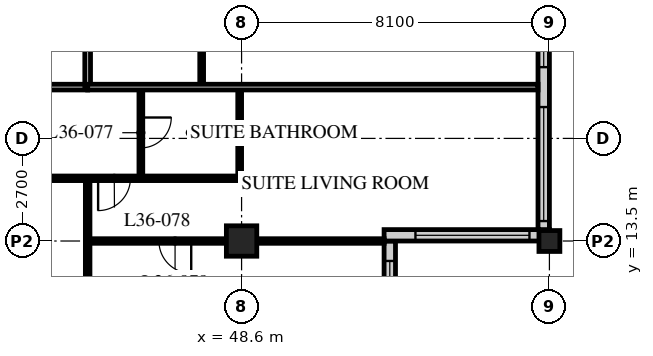
"""IFC4 building model, lengths in metres.
Left out: names, types, materials, properties, quantities, classifications, styles, units other than length and angle.
Written with IfcOpenShell. Run it as: python <this file> out.ifc"""

import sys

from ifc_helpers import new_model, si_unit, direction, frame, frame_2d, origin, origin_2d, place, context, subcontext, project, spatial, rectangle, hollow_rectangle, extrude, element, fill, save


model = new_model("IFC4")
c1 = context("Model", 3, precision=1e-05, world=origin(), true_north=direction((0.0, 1.0)))
c2 = subcontext(c1, "Body", "Model", "MODEL_VIEW")
j1 = project(units=[si_unit("LENGTHUNIT", "METRE"), si_unit("PLANEANGLEUNIT", "RADIAN")], contexts=[c1])
p1 = place(None, origin())
s1 = spatial("IfcSite", under=j1, at=p1, CompositionType="ELEMENT")
p2 = place(p1, origin())
s2 = spatial("IfcBuilding", under=s1, at=p2, CompositionType="ELEMENT")
p3 = place(p2, frame((0.0, 0.0, 140.8)))
s3 = spatial("IfcBuildingStorey", under=s2, at=p3, CompositionType="ELEMENT", Elevation=140.8)
p4 = place(p3, frame((48.6, 13.5, 0.0), z_axis=(0.0, 0.0, 1.0), x_axis=(1.0, 0.0, 0.0)))
e1 = element("IfcColumn", 1, at=p4, inside=s3, PredefinedType="COLUMN", context=c2, shape_type="SweptSolid", body=[
    extrude(hollow_rectangle(XDim=0.8, YDim=0.8, WallThickness=0.08, at=origin_2d()), origin(), (0.0, 0.0, 1.0), 3.4),
])
p5 = place(p3, frame((56.7, 13.5, 0.0), z_axis=(0.0, 0.0, 1.0), x_axis=(1.0, 0.0, 0.0)))
e2 = element("IfcColumn", 2, at=p5, inside=s3, PredefinedType="COLUMN", context=c2, shape_type="SweptSolid", body=[
    extrude(hollow_rectangle(XDim=0.55, YDim=0.55, WallThickness=0.04, at=origin_2d()), origin(), (0.0, 0.0, 1.0), 3.4),
])
p6 = place(p3, frame((52.5, 9.75, 0.0), z_axis=(0.0, 0.0, 1.0), x_axis=(0.0, 1.0, 0.0)))
e3 = element("IfcWall", 3, at=p6, inside=s3, PredefinedType="SOLIDWALL", context=c2, shape_type="SweptSolid", body=[
    extrude(rectangle(XDim=3.75, YDim=0.3, at=frame_2d((1.875, 0.0))), origin(), (0.0, 0.0, 1.0), 3.19),
])
p7 = place(p6, frame((0.225, 0.0, 0.9)))
e4 = element("IfcOpeningElement", 4, at=p7, cuts=e3, PredefinedType="OPENING", context=c2, shape_type="SweptSolid", body=[
    extrude(rectangle(XDim=3.0, YDim=1.5, at=frame_2d((1.5, 0.75))), frame((0.0, 0.16, 0.0), z_axis=(0.0, -1.0, 0.0), x_axis=(1.0, 0.0, 0.0)), (0.0, 0.0, 1.0), 0.32),
])
p8 = place(p3, frame((52.35, 13.65, 0.0), z_axis=(0.0, 0.0, 1.0), x_axis=(1.0, 0.0, 0.0)))
e5 = element("IfcWall", 5, at=p8, inside=s3, PredefinedType="SOLIDWALL", context=c2, shape_type="SweptSolid", body=[
    extrude(rectangle(XDim=4.35, YDim=0.3, at=frame_2d((2.175, 0.0))), origin(), (0.0, 0.0, 1.0), 3.19),
])
p9 = place(p8, frame((0.825, 0.0, 0.9)))
e6 = element("IfcOpeningElement", 6, at=p9, cuts=e5, PredefinedType="OPENING", context=c2, shape_type="SweptSolid", body=[
    extrude(rectangle(XDim=3.0, YDim=1.5, at=frame_2d((1.5, 0.75))), frame((0.0, 0.16, 0.0), z_axis=(0.0, -1.0, 0.0), x_axis=(1.0, 0.0, 0.0)), (0.0, 0.0, 1.0), 0.32),
])
p10 = place(p3, frame((56.55, 13.8, 0.0), z_axis=(0.0, 0.0, 1.0), x_axis=(0.0, 1.0, 0.0)))
e7 = element("IfcWall", 7, at=p10, inside=s3, PredefinedType="SOLIDWALL", context=c2, shape_type="SweptSolid", body=[
    extrude(rectangle(XDim=32.1, YDim=0.3, at=frame_2d((16.05, 0.0))), origin(), (0.0, 0.0, 1.0), 3.19),
])
p11 = place(p10, frame((0.225, 0.0, 0.9)))
e8 = element("IfcOpeningElement", 8, at=p11, cuts=e7, PredefinedType="OPENING", context=c2, shape_type="SweptSolid", body=[
    extrude(rectangle(XDim=3.0, YDim=2.0, at=frame_2d((1.5, 1.0))), frame((0.0, 0.16, 0.0), z_axis=(0.0, -1.0, 0.0), x_axis=(1.0, 0.0, 0.0)), (0.0, 0.0, 1.0), 0.32),
])
p12 = place(p10, frame((4.275, 0.0, 0.9)))
e9 = element("IfcOpeningElement", 9, at=p12, cuts=e7, PredefinedType="OPENING", context=c2, shape_type="SweptSolid", body=[
    extrude(rectangle(XDim=3.0, YDim=2.0, at=frame_2d((1.5, 1.0))), frame((0.0, 0.16, 0.0), z_axis=(0.0, -1.0, 0.0), x_axis=(1.0, 0.0, 0.0)), (0.0, 0.0, 1.0), 0.32),
])
p13 = place(p10, frame((8.325, 0.0, 0.9)))
e10 = element("IfcOpeningElement", 10, at=p13, cuts=e7, PredefinedType="OPENING", context=c2, shape_type="SweptSolid", body=[
    extrude(rectangle(XDim=3.0, YDim=2.0, at=frame_2d((1.5, 1.0))), frame((0.0, 0.16, 0.0), z_axis=(0.0, -1.0, 0.0), x_axis=(1.0, 0.0, 0.0)), (0.0, 0.0, 1.0), 0.32),
])
p14 = place(p10, frame((12.375, 0.0, 0.9)))
e11 = element("IfcOpeningElement", 11, at=p14, cuts=e7, PredefinedType="OPENING", context=c2, shape_type="SweptSolid", body=[
    extrude(rectangle(XDim=3.0, YDim=2.0, at=frame_2d((1.5, 1.0))), frame((0.0, 0.16, 0.0), z_axis=(0.0, -1.0, 0.0), x_axis=(1.0, 0.0, 0.0)), (0.0, 0.0, 1.0), 0.32),
])
p15 = place(p10, frame((16.425, 0.0, 0.9)))
e12 = element("IfcOpeningElement", 12, at=p15, cuts=e7, PredefinedType="OPENING", context=c2, shape_type="SweptSolid", body=[
    extrude(rectangle(XDim=3.0, YDim=2.0, at=frame_2d((1.5, 1.0))), frame((0.0, 0.16, 0.0), z_axis=(0.0, -1.0, 0.0), x_axis=(1.0, 0.0, 0.0)), (0.0, 0.0, 1.0), 0.32),
])
p16 = place(p10, frame((20.475, 0.0, 0.9)))
e13 = element("IfcOpeningElement", 13, at=p16, cuts=e7, PredefinedType="OPENING", context=c2, shape_type="SweptSolid", body=[
    extrude(rectangle(XDim=3.0, YDim=2.0, at=frame_2d((1.5, 1.0))), frame((0.0, 0.16, 0.0), z_axis=(0.0, -1.0, 0.0), x_axis=(1.0, 0.0, 0.0)), (0.0, 0.0, 1.0), 0.32),
])
p17 = place(p10, frame((24.525, 0.0, 0.9)))
e14 = element("IfcOpeningElement", 14, at=p17, cuts=e7, PredefinedType="OPENING", context=c2, shape_type="SweptSolid", body=[
    extrude(rectangle(XDim=3.0, YDim=2.0, at=frame_2d((1.5, 1.0))), frame((0.0, 0.16, 0.0), z_axis=(0.0, -1.0, 0.0), x_axis=(1.0, 0.0, 0.0)), (0.0, 0.0, 1.0), 0.32),
])
p18 = place(p10, frame((28.575, 0.0, 0.9)))
e15 = element("IfcOpeningElement", 15, at=p18, cuts=e7, PredefinedType="OPENING", context=c2, shape_type="SweptSolid", body=[
    extrude(rectangle(XDim=3.0, YDim=2.0, at=frame_2d((1.5, 1.0))), frame((0.0, 0.16, 0.0), z_axis=(0.0, -1.0, 0.0), x_axis=(1.0, 0.0, 0.0)), (0.0, 0.0, 1.0), 0.32),
])
p19 = place(p3, frame((8.1, 17.55, 0.0), z_axis=(0.0, 0.0, 1.0), x_axis=(1.0, 0.0, 0.0)))
e16 = element("IfcWall", 16, at=p19, inside=s3, PredefinedType="PARTITIONING", context=c2, shape_type="SweptSolid", body=[
    extrude(rectangle(XDim=36.45, YDim=0.15, at=frame_2d((18.225, 0.0))), origin(), (0.0, 0.0, 1.0), 3.19),
])
p20 = place(p19, frame((9.625, 0.0, 0.0)))
e17 = element("IfcOpeningElement", 17, at=p20, cuts=e16, PredefinedType="OPENING", context=c2, shape_type="SweptSolid", body=[
    extrude(rectangle(XDim=1.0, YDim=2.1, at=frame_2d((0.5, 1.05))), frame((0.0, 0.085, 0.0), z_axis=(0.0, -1.0, 0.0), x_axis=(1.0, 0.0, 0.0)), (0.0, 0.0, 1.0), 0.17),
])
p21 = place(p19, frame((18.1, 0.0, 0.0)))
e18 = element("IfcOpeningElement", 18, at=p21, cuts=e16, PredefinedType="OPENING", context=c2, shape_type="SweptSolid", body=[
    extrude(rectangle(XDim=1.0, YDim=2.1, at=frame_2d((0.5, 1.05))), frame((0.0, 0.085, 0.0), z_axis=(0.0, -1.0, 0.0), x_axis=(1.0, 0.0, 0.0)), (0.0, 0.0, 1.0), 0.17),
])
p22 = place(p19, frame((26.75, 0.0, 0.0)))
e19 = element("IfcOpeningElement", 19, at=p22, cuts=e16, PredefinedType="OPENING", context=c2, shape_type="SweptSolid", body=[
    extrude(rectangle(XDim=1.0, YDim=2.1, at=frame_2d((0.5, 1.05))), frame((0.0, 0.085, 0.0), z_axis=(0.0, -1.0, 0.0), x_axis=(1.0, 0.0, 0.0)), (0.0, 0.0, 1.0), 0.17),
])
p23 = place(p19, frame((30.8, 0.0, 0.0)))
e20 = element("IfcOpeningElement", 20, at=p23, cuts=e16, PredefinedType="OPENING", context=c2, shape_type="SweptSolid", body=[
    extrude(rectangle(XDim=1.0, YDim=2.1, at=frame_2d((0.5, 1.05))), frame((0.0, 0.085, 0.0), z_axis=(0.0, -1.0, 0.0), x_axis=(1.0, 0.0, 0.0)), (0.0, 0.0, 1.0), 0.17),
])
p24 = place(p19, frame((1.525, 0.0, 0.0)))
e21 = element("IfcOpeningElement", 21, at=p24, cuts=e16, PredefinedType="OPENING", context=c2, shape_type="SweptSolid", body=[
    extrude(rectangle(XDim=1.0, YDim=2.1, at=frame_2d((0.5, 1.05))), frame((0.0, 0.085, 0.0), z_axis=(0.0, -1.0, 0.0), x_axis=(1.0, 0.0, 0.0)), (0.0, 0.0, 1.0), 0.17),
])
p25 = place(p19, frame((33.925, 0.0, 0.0)))
e22 = element("IfcOpeningElement", 22, at=p25, cuts=e16, PredefinedType="OPENING", context=c2, shape_type="SweptSolid", body=[
    extrude(rectangle(XDim=1.0, YDim=2.1, at=frame_2d((0.5, 1.05))), frame((0.0, 0.085, 0.0), z_axis=(0.0, -1.0, 0.0), x_axis=(1.0, 0.0, 0.0)), (0.0, 0.0, 1.0), 0.17),
])
p26 = place(p3, frame((44.55, 17.55, 0.0), z_axis=(0.0, 0.0, 1.0), x_axis=(0.0, 1.0, 0.0)))
e23 = element("IfcWall", 23, at=p26, inside=s3, PredefinedType="PARTITIONING", context=c2, shape_type="SweptSolid", body=[
    extrude(rectangle(XDim=28.35, YDim=0.15, at=frame_2d((14.175, 0.0))), origin(), (0.0, 0.0, 1.0), 3.19),
])
p27 = place(p26, frame((2.75, 0.0, 0.0)))
e24 = element("IfcOpeningElement", 24, at=p27, cuts=e23, PredefinedType="OPENING", context=c2, shape_type="SweptSolid", body=[
    extrude(rectangle(XDim=1.0, YDim=2.1, at=frame_2d((0.5, 1.05))), frame((0.0, 0.085, 0.0), z_axis=(0.0, -1.0, 0.0), x_axis=(1.0, 0.0, 0.0)), (0.0, 0.0, 1.0), 0.17),
])
p28 = place(p26, frame((6.5, 0.0, 0.0)))
e25 = element("IfcOpeningElement", 25, at=p28, cuts=e23, PredefinedType="OPENING", context=c2, shape_type="SweptSolid", body=[
    extrude(rectangle(XDim=1.0, YDim=2.1, at=frame_2d((0.5, 1.05))), frame((0.0, 0.085, 0.0), z_axis=(0.0, -1.0, 0.0), x_axis=(1.0, 0.0, 0.0)), (0.0, 0.0, 1.0), 0.17),
])
p29 = place(p26, frame((13.55, 0.0, 0.0)))
e26 = element("IfcOpeningElement", 26, at=p29, cuts=e23, PredefinedType="OPENING", context=c2, shape_type="SweptSolid", body=[
    extrude(rectangle(XDim=1.0, YDim=2.1, at=frame_2d((0.5, 1.05))), frame((0.0, 0.085, 0.0), z_axis=(0.0, -1.0, 0.0), x_axis=(1.0, 0.0, 0.0)), (0.0, 0.0, 1.0), 0.17),
])
p30 = place(p26, frame((18.1, 0.0, 0.0)))
e27 = element("IfcOpeningElement", 27, at=p30, cuts=e23, PredefinedType="OPENING", context=c2, shape_type="SweptSolid", body=[
    extrude(rectangle(XDim=1.0, YDim=2.1, at=frame_2d((0.5, 1.05))), frame((0.0, 0.085, 0.0), z_axis=(0.0, -1.0, 0.0), x_axis=(1.0, 0.0, 0.0)), (0.0, 0.0, 1.0), 0.17),
])
p31 = place(p26, frame((26.75, 0.0, 0.0)))
e28 = element("IfcOpeningElement", 28, at=p31, cuts=e23, PredefinedType="OPENING", context=c2, shape_type="SweptSolid", body=[
    extrude(rectangle(XDim=1.0, YDim=2.1, at=frame_2d((0.5, 1.05))), frame((0.0, 0.085, 0.0), z_axis=(0.0, -1.0, 0.0), x_axis=(1.0, 0.0, 0.0)), (0.0, 0.0, 1.0), 0.17),
])
p32 = place(p3, frame((47.55, 17.55, 0.0), z_axis=(0.0, 0.0, 1.0), x_axis=(0.0, 1.0, 0.0)))
e29 = element("IfcWall", 29, at=p32, inside=s3, PredefinedType="PARTITIONING", context=c2, shape_type="SweptSolid", body=[
    extrude(rectangle(XDim=2.6, YDim=0.1, at=frame_2d((1.3, 0.0))), origin(), (0.0, 0.0, 1.0), 3.19),
])
p33 = place(p3, frame((40.5, 15.15, 0.0), z_axis=(0.0, 0.0, 1.0), x_axis=(1.0, 0.0, 0.0)))
e30 = element("IfcWall", 30, at=p33, inside=s3, PredefinedType="PARTITIONING", context=c2, shape_type="SweptSolid", body=[
    extrude(rectangle(XDim=8.05, YDim=0.12, at=frame_2d((4.025, 0.0))), origin(), (0.0, 0.0, 1.0), 3.19),
])
p34 = place(p33, frame((0.475, 0.0, 0.0)))
e31 = element("IfcOpeningElement", 31, at=p34, cuts=e30, PredefinedType="OPENING", context=c2, shape_type="SweptSolid", body=[
    extrude(rectangle(XDim=0.85, YDim=2.1, at=frame_2d((0.425, 1.05))), frame((0.0, 0.07, 0.0), z_axis=(0.0, -1.0, 0.0), x_axis=(1.0, 0.0, 0.0)), (0.0, 0.0, 1.0), 0.14),
])
p35 = place(p33, frame((4.325, 0.0, 0.0)))
e32 = element("IfcOpeningElement", 32, at=p35, cuts=e30, PredefinedType="OPENING", context=c2, shape_type="SweptSolid", body=[
    extrude(rectangle(XDim=0.85, YDim=2.1, at=frame_2d((0.425, 1.05))), frame((0.0, 0.07, 0.0), z_axis=(0.0, -1.0, 0.0), x_axis=(1.0, 0.0, 0.0)), (0.0, 0.0, 1.0), 0.14),
])
p36 = place(p3, frame((45.95, 17.55, 0.0), z_axis=(0.0, 0.0, 1.0), x_axis=(0.0, -1.0, 0.0)))
e33 = element("IfcWall", 33, at=p36, inside=s3, PredefinedType="PARTITIONING", context=c2, shape_type="SweptSolid", body=[
    extrude(rectangle(XDim=2.4, YDim=0.1, at=frame_2d((1.2, 0.0))), origin(), (0.0, 0.0, 1.0), 3.19),
])
p37 = place(p36, frame((0.8, 0.0, 0.0)))
e34 = element("IfcOpeningElement", 34, at=p37, cuts=e33, PredefinedType="OPENING", context=c2, shape_type="SweptSolid", body=[
    extrude(rectangle(XDim=0.8, YDim=2.1, at=frame_2d((0.4, 1.05))), frame((0.0, 0.06, 0.0), z_axis=(0.0, -1.0, 0.0), x_axis=(1.0, 0.0, 0.0)), (0.0, 0.0, 1.0), 0.12),
])
p38 = place(p3, frame((48.55, 17.55, 0.0), z_axis=(0.0, 0.0, 1.0), x_axis=(0.0, -1.0, 0.0)))
e35 = element("IfcWall", 35, at=p38, inside=s3, PredefinedType="PARTITIONING", context=c2, shape_type="SweptSolid", body=[
    extrude(rectangle(XDim=2.4, YDim=0.1, at=frame_2d((1.2, 0.0))), origin(), (0.0, 0.0, 1.0), 2.578),
])
p39 = place(p3, frame((44.55, 15.15, 0.0), z_axis=(0.0, 0.0, 1.0), x_axis=(0.0, -1.0, 0.0)))
e36 = element("IfcWall", 36, at=p39, inside=s3, PredefinedType="PARTITIONING", context=c2, shape_type="SweptSolid", body=[
    extrude(rectangle(XDim=9.45, YDim=0.12, at=frame_2d((4.725, 0.0))), origin(), (0.0, 0.0, 1.0), 3.19),
])
p40 = place(p3, frame((44.55, 13.5, 0.0), z_axis=(0.0, 0.0, 1.0), x_axis=(1.0, 0.0, 0.0)))
e37 = element("IfcWall", 37, at=p40, inside=s3, PredefinedType="PARTITIONING", context=c2, shape_type="SweptSolid", body=[
    extrude(rectangle(XDim=7.8, YDim=0.12, at=frame_2d((3.9, 0.0))), origin(), (0.0, 0.0, 1.0), 2.578),
])
p41 = place(p40, frame((1.875, 0.0, 0.0)))
e38 = element("IfcOpeningElement", 38, at=p41, cuts=e37, PredefinedType="OPENING", context=c2, shape_type="SweptSolid", body=[
    extrude(rectangle(XDim=0.85, YDim=2.1, at=frame_2d((0.425, 1.05))), frame((0.0, 0.07, 0.0), z_axis=(0.0, -1.0, 0.0), x_axis=(1.0, 0.0, 0.0)), (0.0, 0.0, 1.0), 0.14),
])
p42 = place(p3, frame((44.55, 17.55, 0.0), z_axis=(0.0, 0.0, 1.0), x_axis=(1.0, 0.0, 0.0)))
e39 = element("IfcWall", 39, at=p42, inside=s3, PredefinedType="PARTITIONING", context=c2, shape_type="SweptSolid", body=[
    extrude(rectangle(XDim=11.85, YDim=0.15, at=frame_2d((5.925, 0.0))), origin(), (0.0, 0.0, 1.0), 3.19),
])
p43 = place(p7, origin())
e40 = element("IfcWindow", 40, at=p43, inside=s3, PartitioningType="SINGLE_PANEL", PredefinedType="WINDOW", context=c2, shape_type="SweptSolid", body=[
    extrude(rectangle(XDim=3.0, YDim=1.5, at=frame_2d((1.5, 0.75))), frame((0.0, 0.03, 0.0), z_axis=(0.0, -1.0, 0.0), x_axis=(1.0, 0.0, 0.0)), (0.0, 0.0, 1.0), 0.06),
])
fill(e4, e40)
p44 = place(p9, origin())
e41 = element("IfcWindow", 41, at=p44, inside=s3, PartitioningType="SINGLE_PANEL", PredefinedType="WINDOW", context=c2, shape_type="SweptSolid", body=[
    extrude(rectangle(XDim=3.0, YDim=1.5, at=frame_2d((1.5, 0.75))), frame((0.0, 0.03, 0.0), z_axis=(0.0, -1.0, 0.0), x_axis=(1.0, 0.0, 0.0)), (0.0, 0.0, 1.0), 0.06),
])
fill(e6, e41)
p45 = place(p11, origin())
e42 = element("IfcWindow", 42, at=p45, inside=s3, PartitioningType="SINGLE_PANEL", PredefinedType="WINDOW", context=c2, shape_type="SweptSolid", body=[
    extrude(rectangle(XDim=3.0, YDim=2.0, at=frame_2d((1.5, 1.0))), frame((0.0, 0.03, 0.0), z_axis=(0.0, -1.0, 0.0), x_axis=(1.0, 0.0, 0.0)), (0.0, 0.0, 1.0), 0.06),
])
fill(e8, e42)
p46 = place(p12, origin())
e43 = element("IfcWindow", 43, at=p46, inside=s3, PartitioningType="SINGLE_PANEL", PredefinedType="WINDOW", context=c2, shape_type="SweptSolid", body=[
    extrude(rectangle(XDim=3.0, YDim=2.0, at=frame_2d((1.5, 1.0))), frame((0.0, 0.03, 0.0), z_axis=(0.0, -1.0, 0.0), x_axis=(1.0, 0.0, 0.0)), (0.0, 0.0, 1.0), 0.06),
])
fill(e9, e43)
p47 = place(p37, origin())
e44 = element("IfcDoor", 44, at=p47, inside=s3, OperationType="SINGLE_SWING_LEFT", PredefinedType="DOOR", context=c2, shape_type="SweptSolid", body=[
    extrude(rectangle(XDim=0.8, YDim=2.1, at=frame_2d((0.4, 1.05))), frame((0.0, 0.025, 0.0), z_axis=(0.0, -1.0, 0.0), x_axis=(1.0, 0.0, 0.0)), (0.0, 0.0, 1.0), 0.05),
])
fill(e34, e44)
p48 = place(p35, origin())
e45 = element("IfcDoor", 45, at=p48, inside=s3, OperationType="SINGLE_SWING_RIGHT", PredefinedType="DOOR", context=c2, shape_type="SweptSolid", body=[
    extrude(rectangle(XDim=0.85, YDim=2.1, at=frame_2d((0.425, 1.05))), frame((0.0, 0.025, 0.0), z_axis=(0.0, -1.0, 0.0), x_axis=(1.0, 0.0, 0.0)), (0.0, 0.0, 1.0), 0.05),
])
fill(e32, e45)
p49 = place(p41, origin())
e46 = element("IfcDoor", 46, at=p49, inside=s3, OperationType="SINGLE_SWING_LEFT", PredefinedType="DOOR", context=c2, shape_type="SweptSolid", body=[
    extrude(rectangle(XDim=0.85, YDim=2.1, at=frame_2d((0.425, 1.05))), frame((0.0, 0.025, 0.0), z_axis=(0.0, -1.0, 0.0), x_axis=(1.0, 0.0, 0.0)), (0.0, 0.0, 1.0), 0.05),
])
fill(e38, e46)
save(model, sys.argv[1])
